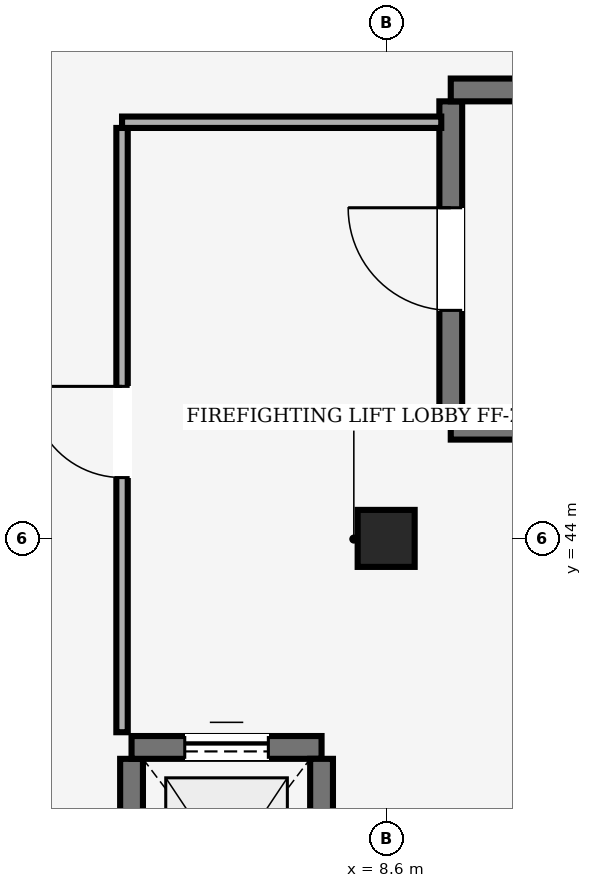
"""IFC4 building model, lengths in metres.
Left out: names, types, materials, properties, quantities, classifications, styles, units other than length and angle.
Written with IfcOpenShell. Run it as: python <this file> out.ifc"""

import sys

from ifc_helpers import new_model, si_unit, direction, frame, frame_2d, origin, origin_2d, place, context, subcontext, project, spatial, rectangle, extrude, element, fill, save


model = new_model("IFC4")
c1 = context("Model", 3, precision=1e-05, world=origin(), true_north=direction((0.0, 1.0)))
c2 = subcontext(c1, "Body", "Model", "MODEL_VIEW")
j1 = project(units=[si_unit("LENGTHUNIT", "METRE"), si_unit("PLANEANGLEUNIT", "RADIAN")], contexts=[c1])
p1 = place(None, origin())
s1 = spatial("IfcSite", under=j1, at=p1, CompositionType="ELEMENT")
p2 = place(p1, origin())
s2 = spatial("IfcBuilding", under=s1, at=p2, CompositionType="ELEMENT")
p3 = place(p2, frame((0.0, 0.0, 4.5)))
s3 = spatial("IfcBuildingStorey", under=s2, at=p3, CompositionType="ELEMENT", Elevation=4.5)
p4 = place(p3, frame((8.6, 44.0, 0.0), z_axis=(0.0, 0.0, 1.0), x_axis=(1.0, 0.0, 0.0)))
e1 = element("IfcColumn", 1, at=p4, inside=s3, PredefinedType="COLUMN", context=c2, shape_type="SweptSolid", body=[
    extrude(rectangle(XDim=0.75, YDim=0.75, at=origin_2d()), origin(), (0.0, 0.0, 1.0), 3.65),
])
p5 = place(p3, frame((19.63, 45.45, 0.0), z_axis=(0.0, 0.0, 1.0), x_axis=(-1.0, 0.0, 0.0)))
e2 = element("IfcWall", 2, at=p5, inside=s3, PredefinedType="SHEAR", context=c2, shape_type="SweptSolid", body=[
    extrude(rectangle(XDim=10.18, YDim=0.3, at=frame_2d((5.09, 0.0))), origin(), (0.0, 0.0, 1.0), 3.65),
])
p6 = place(p3, frame((9.45, 45.6, 0.0), z_axis=(0.0, 0.0, 1.0), x_axis=(0.0, 1.0, 0.0)))
e3 = element("IfcWall", 3, at=p6, inside=s3, PredefinedType="SHEAR", context=c2, shape_type="SweptSolid", body=[
    extrude(rectangle(XDim=4.15, YDim=0.3, at=frame_2d((2.075, 0.0))), origin(), (0.0, 0.0, 1.0), 3.65),
])
p7 = place(p6, frame((1.4, 0.0, 0.0)))
e4 = element("IfcOpeningElement", 4, at=p7, cuts=e3, PredefinedType="OPENING", context=c2, shape_type="SweptSolid", body=[
    extrude(rectangle(XDim=1.35, YDim=2.2, at=frame_2d((0.675, 1.1))), frame((0.0, 0.15, 0.0), z_axis=(0.0, -1.0, 0.0), x_axis=(1.0, 0.0, 0.0)), (0.0, 0.0, 1.0), 0.3),
])
p8 = place(p3, frame((9.45, 49.9, 0.0), z_axis=(0.0, 0.0, 1.0), x_axis=(1.0, 0.0, 0.0)))
e5 = element("IfcWall", 5, at=p8, inside=s3, PredefinedType="SHEAR", context=c2, shape_type="SweptSolid", body=[
    extrude(rectangle(XDim=10.18, YDim=0.3, at=frame_2d((5.09, 0.0))), origin(), (0.0, 0.0, 1.0), 3.65),
])
p9 = place(p3, frame((5.25, 38.2, 0.0), z_axis=(0.0, 0.0, 1.0), x_axis=(0.0, 1.0, 0.0)))
e6 = element("IfcWall", 6, at=p9, inside=s3, PredefinedType="SHEAR", context=c2, shape_type="SweptSolid", body=[
    extrude(rectangle(XDim=2.9, YDim=0.3, at=frame_2d((1.45, 0.0))), origin(), (0.0, 0.0, 1.0), 3.65),
])
p10 = place(p3, frame((5.25, 41.25, 0.0), z_axis=(0.0, 0.0, 1.0), x_axis=(1.0, 0.0, 0.0)))
e7 = element("IfcWall", 7, at=p10, inside=s3, PredefinedType="SHEAR", context=c2, shape_type="SweptSolid", body=[
    extrude(rectangle(XDim=2.5, YDim=0.3, at=frame_2d((1.25, 0.0))), origin(), (0.0, 0.0, 1.0), 3.65),
])
p11 = place(p10, frame((0.7, 0.0, 0.0)))
e8 = element("IfcOpeningElement", 8, at=p11, cuts=e7, PredefinedType="OPENING", context=c2, shape_type="SweptSolid", body=[
    extrude(rectangle(XDim=1.1, YDim=2.1, at=frame_2d((0.55, 1.05))), frame((0.0, 0.15, 0.0), z_axis=(0.0, -1.0, 0.0), x_axis=(1.0, 0.0, 0.0)), (0.0, 0.0, 1.0), 0.3),
])
p12 = place(p3, frame((7.75, 41.1, 0.0), z_axis=(0.0, 0.0, 1.0), x_axis=(0.0, -1.0, 0.0)))
e9 = element("IfcWall", 9, at=p12, inside=s3, PredefinedType="SHEAR", context=c2, shape_type="SweptSolid", body=[
    extrude(rectangle(XDim=2.9, YDim=0.3, at=frame_2d((1.45, 0.0))), origin(), (0.0, 0.0, 1.0), 3.65),
])
p13 = place(p3, frame((5.125, 41.45, 0.0), z_axis=(0.0, 0.0, 1.0), x_axis=(0.0, 1.0, 0.0)))
e10 = element("IfcWall", 10, at=p13, inside=s3, PredefinedType="PARTITIONING", context=c2, shape_type="SweptSolid", body=[
    extrude(rectangle(XDim=7.95, YDim=0.15, at=frame_2d((3.975, 0.0))), origin(), (0.0, 0.0, 1.0), 3.63),
])
p14 = place(p13, frame((3.35, 0.0, 0.0)))
e11 = element("IfcOpeningElement", 11, at=p14, cuts=e10, PredefinedType="OPENING", context=c2, shape_type="SweptSolid", body=[
    extrude(rectangle(XDim=1.2, YDim=2.15, at=frame_2d((0.6, 1.075))), frame((0.0, 0.075, 0.0), z_axis=(0.0, -1.0, 0.0), x_axis=(1.0, 0.0, 0.0)), (0.0, 0.0, 1.0), 0.15),
])
p15 = place(p3, frame((5.125, 49.475, 0.0), z_axis=(0.0, 0.0, 1.0), x_axis=(1.0, 0.0, 0.0)))
e12 = element("IfcWall", 12, at=p15, inside=s3, PredefinedType="PARTITIONING", context=c2, shape_type="SweptSolid", body=[
    extrude(rectangle(XDim=4.2, YDim=0.15, at=frame_2d((2.1, 0.0))), origin(), (0.0, 0.0, 1.0), 3.63),
])
p16 = place(p7, origin())
e13 = element("IfcDoor", 13, at=p16, inside=s3, OperationType="SINGLE_SWING_RIGHT", PredefinedType="DOOR", context=c2, shape_type="SweptSolid", body=[
    extrude(rectangle(XDim=1.35, YDim=2.2, at=frame_2d((0.675, 1.1))), frame((0.0, 0.025, 0.0), z_axis=(0.0, -1.0, 0.0), x_axis=(1.0, 0.0, 0.0)), (0.0, 0.0, 1.0), 0.05),
])
fill(e4, e13)
p17 = place(p11, origin())
e14 = element("IfcDoor", 14, at=p17, inside=s3, OperationType="SLIDING_TO_LEFT", PredefinedType="DOOR", context=c2, shape_type="SweptSolid", body=[
    extrude(rectangle(XDim=1.1, YDim=2.1, at=frame_2d((0.55, 1.05))), frame((0.0, 0.025, 0.0), z_axis=(0.0, -1.0, 0.0), x_axis=(1.0, 0.0, 0.0)), (0.0, 0.0, 1.0), 0.05),
])
fill(e8, e14)
p18 = place(p14, origin())
e15 = element("IfcDoor", 15, at=p18, inside=s3, OperationType="SINGLE_SWING_RIGHT", PredefinedType="DOOR", context=c2, shape_type="SweptSolid", body=[
    extrude(rectangle(XDim=1.2, YDim=2.15, at=frame_2d((0.6, 1.075))), frame((0.0, 0.025, 0.0), z_axis=(0.0, -1.0, 0.0), x_axis=(1.0, 0.0, 0.0)), (0.0, 0.0, 1.0), 0.05),
])
fill(e11, e15)
save(model, sys.argv[1])
